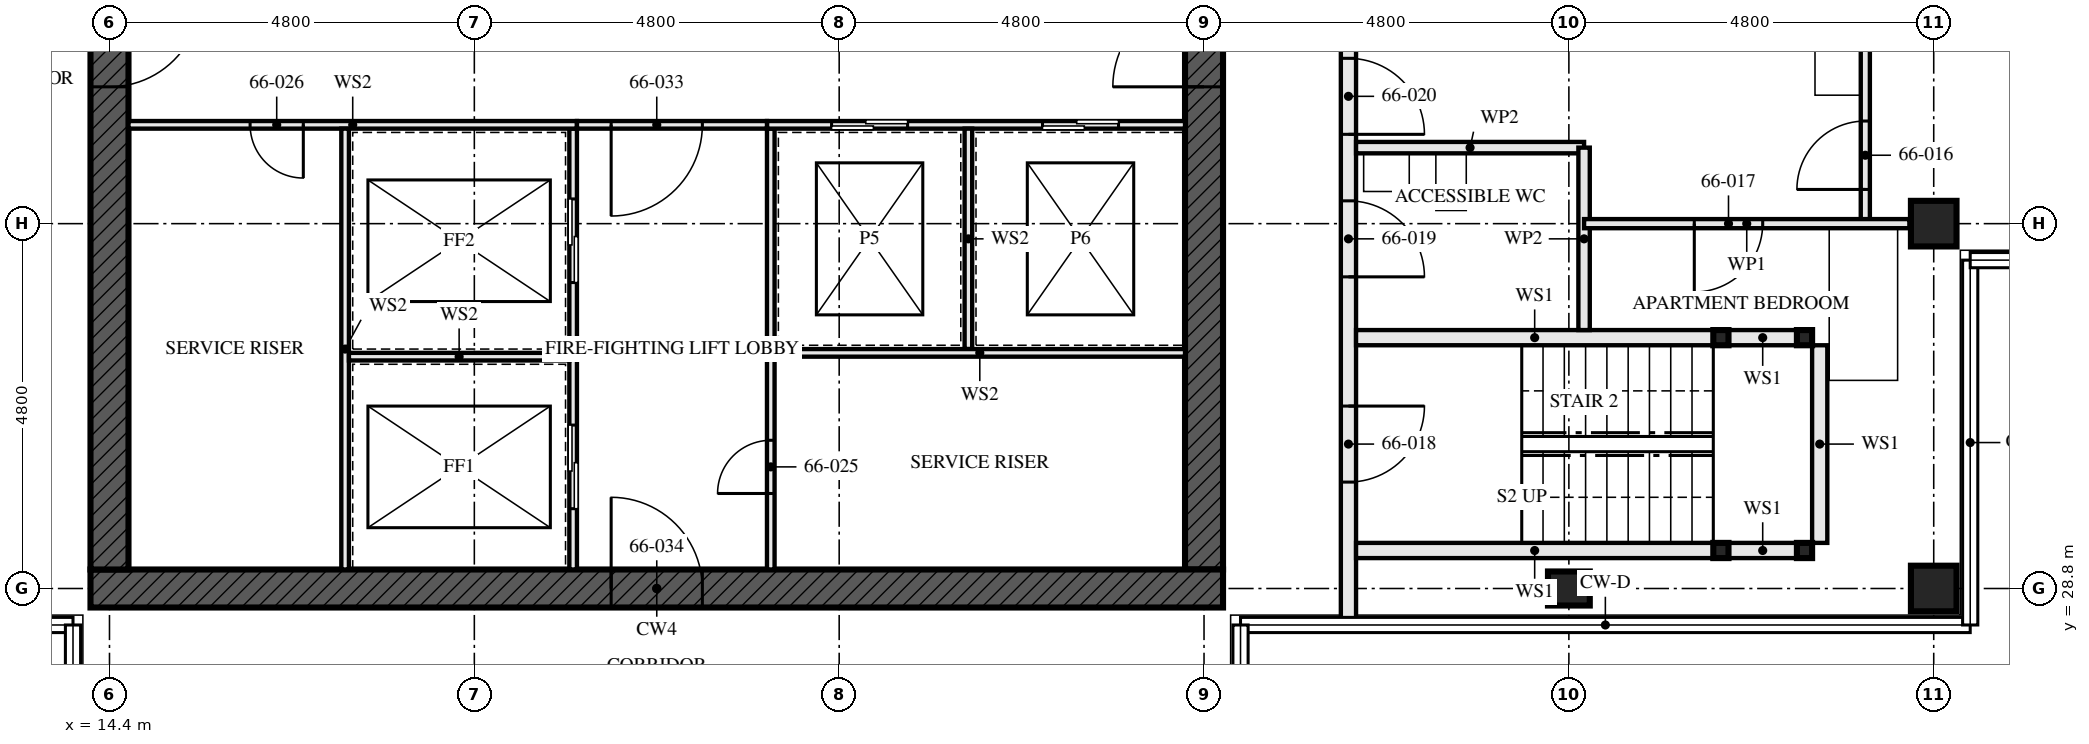
"""IFC4 building model, lengths in metres.
Left out: names, types, materials, properties, quantities, classifications, styles, units other than length and angle.
Written with IfcOpenShell. Run it as: python <this file> out.ifc"""

import sys

from ifc_helpers import new_model, si_unit, direction, frame, frame_2d, origin, origin_2d, place, context, subcontext, project, spatial, rectangle, hollow_rectangle, i_section, extrude, element, fill, save


model = new_model("IFC4")
c1 = context("Model", 3, precision=1e-05, world=origin(), true_north=direction((0.0, 1.0)))
c2 = subcontext(c1, "Body", "Model", "MODEL_VIEW")
j1 = project(units=[si_unit("LENGTHUNIT", "METRE"), si_unit("PLANEANGLEUNIT", "RADIAN")], contexts=[c1])
p1 = place(None, origin())
s1 = spatial("IfcSite", under=j1, at=p1, CompositionType="ELEMENT")
p2 = place(p1, origin())
s2 = spatial("IfcBuilding", under=s1, at=p2, CompositionType="ELEMENT")
p3 = place(p2, frame((0.0, 0.0, 240.0)))
s3 = spatial("IfcBuildingStorey", under=s2, at=p3, CompositionType="ELEMENT", Elevation=240.0)
p4 = place(p3, frame((33.6, 28.8, 0.0), z_axis=(0.0, 0.0, 1.0), x_axis=(0.0, 1.0, 0.0)))
e1 = element("IfcColumn", 1, at=p4, inside=s3, PredefinedType="COLUMN", context=c2, shape_type="SweptSolid", body=[
    extrude(i_section(OverallWidth=0.448, OverallDepth=0.55, WebThickness=0.072, FlangeThickness=0.115, FilletRadius=0.015, at=origin_2d()), origin(), (0.0, 0.0, 1.0), 3.5),
])
for number, where, z_axis, x_axis in (
    (2, (38.4, 28.8, 0.0), (0.0, 0.0, 1.0), (0.0, 1.0, 0.0)),
    (3, (38.4, 33.6, 0.0), (0.0, 0.0, 1.0), (0.0, 1.0, 0.0)),
):
    element("IfcColumn", number, at=place(p3, frame(where, z_axis=z_axis, x_axis=x_axis)), inside=s3, PredefinedType="COLUMN", context=c2, shape_type="SweptSolid", body=[
        extrude(hollow_rectangle(XDim=0.6, YDim=0.6, WallThickness=0.05, at=origin_2d()), origin(), (0.0, 0.0, 1.0), 3.5),
    ])
p5 = place(p3, frame((14.15, 28.8, -0.17), z_axis=(0.0, 0.0, 1.0), x_axis=(1.0, 0.0, 0.0)))
e4 = element("IfcWall", 4, at=p5, inside=s3, PredefinedType="SHEAR", context=c2, shape_type="SweptSolid", body=[
    extrude(rectangle(XDim=14.9, YDim=0.5, at=frame_2d((7.45, 0.0))), origin(), (0.0, 0.0, 1.0), 3.42),
])
p6 = place(p5, frame((6.85, 0.0, 0.17)))
e5 = element("IfcOpeningElement", 5, at=p6, cuts=e4, PredefinedType="OPENING", context=c2, shape_type="SweptSolid", body=[
    extrude(rectangle(XDim=1.2, YDim=2.1, at=frame_2d((0.6, 1.05))), frame((0.0, 0.26, 0.0), z_axis=(0.0, -1.0, 0.0), x_axis=(1.0, 0.0, 0.0)), (0.0, 0.0, 1.0), 0.521),
])
p7 = place(p3, frame((14.4, 42.95, -0.17), z_axis=(0.0, 0.0, 1.0), x_axis=(0.0, -1.0, 0.0)))
e6 = element("IfcWall", 6, at=p7, inside=s3, PredefinedType="SHEAR", context=c2, shape_type="SweptSolid", body=[
    extrude(rectangle(XDim=13.9, YDim=0.5, at=frame_2d((6.95, 0.0))), origin(), (0.0, 0.0, 1.0), 3.42),
])
p8 = place(p7, frame((6.35, 0.0, 0.17)))
e7 = element("IfcOpeningElement", 7, at=p8, cuts=e6, PredefinedType="OPENING", context=c2, shape_type="SweptSolid", body=[
    extrude(rectangle(XDim=1.2, YDim=2.1, at=frame_2d((0.6, 1.05))), frame((0.0, 0.26, 0.0), z_axis=(0.0, -1.0, 0.0), x_axis=(1.0, 0.0, 0.0)), (0.0, 0.0, 1.0), 0.521),
])
p9 = place(p3, frame((28.8, 29.05, -0.17), z_axis=(0.0, 0.0, 1.0), x_axis=(0.0, 1.0, 0.0)))
e8 = element("IfcWall", 8, at=p9, inside=s3, PredefinedType="SHEAR", context=c2, shape_type="SweptSolid", body=[
    extrude(rectangle(XDim=13.9, YDim=0.5, at=frame_2d((6.95, 0.0))), origin(), (0.0, 0.0, 1.0), 3.42),
])
p10 = place(p9, frame((6.35, 0.0, 0.17)))
e9 = element("IfcOpeningElement", 9, at=p10, cuts=e8, PredefinedType="OPENING", context=c2, shape_type="SweptSolid", body=[
    extrude(rectangle(XDim=1.2, YDim=2.1, at=frame_2d((0.6, 1.05))), frame((0.0, 0.26, 0.0), z_axis=(0.0, -1.0, 0.0), x_axis=(1.0, 0.0, 0.0)), (0.0, 0.0, 1.0), 0.521),
])
for number, where, z_axis, x_axis in (
    (10, (36.7, 29.3, 0.0), (0.0, 0.0, 1.0), (1.0, 0.0, 0.0)),
    (11, (36.7, 32.1, 0.0), (0.0, 0.0, 1.0), (1.0, 0.0, 0.0)),
    (12, (35.6, 29.3, 0.0), (0.0, 0.0, 1.0), (1.0, 0.0, 0.0)),
    (13, (35.6, 32.1, 0.0), (0.0, 0.0, 1.0), (1.0, 0.0, 0.0)),
):
    element("IfcColumn", number, at=place(p3, frame(where, z_axis=z_axis, x_axis=x_axis)), inside=s3, PredefinedType="COLUMN", context=c2, shape_type="SweptSolid", body=[
        extrude(hollow_rectangle(XDim=0.2, YDim=0.2, WallThickness=0.008, at=origin_2d()), origin(), (0.0, 0.0, 1.0), 3.25),
    ])
p11 = place(p3, frame((36.6, 29.3, 0.0), z_axis=(0.0, 0.0, 1.0), x_axis=(-1.0, 0.0, 0.0)))
e14 = element("IfcWall", 14, at=p11, inside=s3, PredefinedType="SOLIDWALL", context=c2, shape_type="SweptSolid", body=[
    extrude(rectangle(XDim=0.9, YDim=0.2, at=frame_2d((0.45, 0.0))), origin(), (0.0, 0.0, 1.0), 2.94),
])
p12 = place(p3, frame((35.5, 29.3, 0.0), z_axis=(0.0, 0.0, 1.0), x_axis=(-1.0, 0.0, 0.0)))
e15 = element("IfcWall", 15, at=p12, inside=s3, PredefinedType="SOLIDWALL", context=c2, shape_type="SweptSolid", body=[
    extrude(rectangle(XDim=4.7, YDim=0.2, at=frame_2d((2.35, 0.0))), origin(), (0.0, 0.0, 1.0), 2.94),
])
p13 = place(p3, frame((36.6, 32.1, 0.0), z_axis=(0.0, 0.0, 1.0), x_axis=(-1.0, 0.0, 0.0)))
e16 = element("IfcWall", 16, at=p13, inside=s3, PredefinedType="SOLIDWALL", context=c2, shape_type="SweptSolid", body=[
    extrude(rectangle(XDim=0.9, YDim=0.2, at=frame_2d((0.45, 0.0))), origin(), (0.0, 0.0, 1.0), 2.94),
])
p14 = place(p3, frame((35.5, 32.1, 0.0), z_axis=(0.0, 0.0, 1.0), x_axis=(-1.0, 0.0, 0.0)))
e17 = element("IfcWall", 17, at=p14, inside=s3, PredefinedType="SOLIDWALL", context=c2, shape_type="SweptSolid", body=[
    extrude(rectangle(XDim=4.7, YDim=0.2, at=frame_2d((2.35, 0.0))), origin(), (0.0, 0.0, 1.0), 2.94),
])
p15 = place(p3, frame((36.9, 29.4, 0.0), z_axis=(0.0, 0.0, 1.0), x_axis=(0.0, 1.0, 0.0)))
e18 = element("IfcWall", 18, at=p15, inside=s3, PredefinedType="SOLIDWALL", context=c2, shape_type="SweptSolid", body=[
    extrude(rectangle(XDim=2.6, YDim=0.2, at=frame_2d((1.3, 0.0))), origin(), (0.0, 0.0, 1.0), 3.25),
])
p16 = place(p3, frame((33.8, 32.2, 0.0), z_axis=(0.0, 0.0, 1.0), x_axis=(0.0, 1.0, 0.0)))
e19 = element("IfcWall", 19, at=p16, inside=s3, PredefinedType="PARTITIONING", context=c2, shape_type="SweptSolid", body=[
    extrude(rectangle(XDim=2.4, YDim=0.15, at=frame_2d((1.2, 0.0))), origin(), (0.0, 0.0, 1.0), 2.24),
])
p17 = place(p3, frame((33.8, 34.6, 0.0), z_axis=(0.0, 0.0, 1.0), x_axis=(-1.0, 0.0, 0.0)))
e20 = element("IfcWall", 20, at=p17, inside=s3, PredefinedType="PARTITIONING", context=c2, shape_type="SweptSolid", body=[
    extrude(rectangle(XDim=3.0, YDim=0.15, at=frame_2d((1.5, 0.0))), origin(), (0.0, 0.0, 1.0), 3.25),
])
p18 = place(p3, frame((37.5, 33.6, 0.0), z_axis=(0.0, 0.0, 1.0), x_axis=(0.0, 1.0, 0.0)))
e21 = element("IfcWall", 21, at=p18, inside=s3, PredefinedType="PARTITIONING", context=c2, shape_type="SweptSolid", body=[
    extrude(rectangle(XDim=4.8, YDim=0.12, at=frame_2d((2.4, 0.0))), origin(), (0.0, 0.0, 1.0), 3.25),
])
p19 = place(p18, frame((0.45, 0.0, 0.0)))
e22 = element("IfcOpeningElement", 22, at=p19, cuts=e21, PredefinedType="OPENING", context=c2, shape_type="SweptSolid", body=[
    extrude(rectangle(XDim=0.9, YDim=2.1, at=frame_2d((0.45, 1.05))), frame((0.0, 0.071, 0.0), z_axis=(0.0, -1.0, 0.0), x_axis=(1.0, 0.0, 0.0)), (0.0, 0.0, 1.0), 0.141),
])
p20 = place(p3, frame((38.08, 33.6, 0.0), z_axis=(0.0, 0.0, 1.0), x_axis=(-1.0, 0.0, 0.0)))
e23 = element("IfcWall", 23, at=p20, inside=s3, PredefinedType="PARTITIONING", context=c2, shape_type="SweptSolid", body=[
    extrude(rectangle(XDim=4.28, YDim=0.12, at=frame_2d((2.14, 0.0))), origin(), (0.0, 0.0, 1.0), 2.24),
])
p21 = place(p20, frame((1.93, 0.0, 0.0)))
e24 = element("IfcOpeningElement", 24, at=p21, cuts=e23, PredefinedType="OPENING", context=c2, shape_type="SweptSolid", body=[
    extrude(rectangle(XDim=0.9, YDim=2.1, at=frame_2d((0.45, 1.05))), frame((0.0, 0.071, 0.0), z_axis=(0.0, -1.0, 0.0), x_axis=(1.0, 0.0, 0.0)), (0.0, 0.0, 1.0), 0.141),
])
p22 = place(p3, frame((30.7, 28.345, 0.0), z_axis=(0.0, 0.0, 1.0), x_axis=(0.0, 1.0, 0.0)))
e25 = element("IfcWall", 25, at=p22, inside=s3, PredefinedType="PARTITIONING", context=c2, shape_type="SweptSolid", body=[
    extrude(rectangle(XDim=15.31, YDim=0.2, at=frame_2d((7.655, 0.0))), origin(), (0.0, 0.0, 1.0), 2.24),
])
p23 = place(p22, frame((1.855, 0.0, 0.0)))
e26 = element("IfcOpeningElement", 26, at=p23, cuts=e25, PredefinedType="OPENING", context=c2, shape_type="SweptSolid", body=[
    extrude(rectangle(XDim=1.0, YDim=2.1, at=frame_2d((0.5, 1.05))), frame((0.0, 0.111, 0.0), z_axis=(0.0, -1.0, 0.0), x_axis=(1.0, 0.0, 0.0)), (0.0, 0.0, 1.0), 0.221),
])
p24 = place(p22, frame((4.555, 0.0, 0.0)))
e27 = element("IfcOpeningElement", 27, at=p24, cuts=e25, PredefinedType="OPENING", context=c2, shape_type="SweptSolid", body=[
    extrude(rectangle(XDim=1.0, YDim=2.1, at=frame_2d((0.5, 1.05))), frame((0.0, 0.111, 0.0), z_axis=(0.0, -1.0, 0.0), x_axis=(1.0, 0.0, 0.0)), (0.0, 0.0, 1.0), 0.221),
])
p25 = place(p22, frame((6.43, 0.0, 0.0)))
e28 = element("IfcOpeningElement", 28, at=p25, cuts=e25, PredefinedType="OPENING", context=c2, shape_type="SweptSolid", body=[
    extrude(rectangle(XDim=1.0, YDim=2.1, at=frame_2d((0.5, 1.05))), frame((0.0, 0.111, 0.0), z_axis=(0.0, -1.0, 0.0), x_axis=(1.0, 0.0, 0.0)), (0.0, 0.0, 1.0), 0.221),
])
p26 = place(p3, frame((20.5, 29.05, 0.0), z_axis=(0.0, 0.0, 1.0), x_axis=(0.0, 1.0, 0.0)))
e29 = element("IfcWall", 29, at=p26, inside=s3, PredefinedType="SOLIDWALL", context=c2, shape_type="SweptSolid", body=[
    extrude(rectangle(XDim=5.8, YDim=0.1, at=frame_2d((2.9, 0.0))), origin(), (0.0, 0.0, 1.0), 3.25),
])
p27 = place(p26, frame((0.8, 0.0, 0.0)))
e30 = element("IfcOpeningElement", 30, at=p27, cuts=e29, PredefinedType="OPENING", context=c2, shape_type="SweptSolid", body=[
    extrude(rectangle(XDim=1.1, YDim=2.3, at=frame_2d((0.55, 1.15))), frame((0.0, 0.061, 0.0), z_axis=(0.0, -1.0, 0.0), x_axis=(1.0, 0.0, 0.0)), (0.0, 0.0, 1.0), 0.121),
])
p28 = place(p26, frame((3.775, 0.0, 0.0)))
e31 = element("IfcOpeningElement", 31, at=p28, cuts=e29, PredefinedType="OPENING", context=c2, shape_type="SweptSolid", body=[
    extrude(rectangle(XDim=1.1, YDim=2.3, at=frame_2d((0.55, 1.15))), frame((0.0, 0.061, 0.0), z_axis=(0.0, -1.0, 0.0), x_axis=(1.0, 0.0, 0.0)), (0.0, 0.0, 1.0), 0.121),
])
p29 = place(p3, frame((23.1, 29.05, 0.0), z_axis=(0.0, 0.0, 1.0), x_axis=(0.0, 1.0, 0.0)))
e32 = element("IfcWall", 32, at=p29, inside=s3, PredefinedType="SOLIDWALL", context=c2, shape_type="SweptSolid", body=[
    extrude(rectangle(XDim=5.8, YDim=0.1, at=frame_2d((2.9, 0.0))), origin(), (0.0, 0.0, 1.0), 3.25),
])
p30 = place(p29, frame((1.0, 0.0, 0.0)))
e33 = element("IfcOpeningElement", 33, at=p30, cuts=e32, PredefinedType="OPENING", context=c2, shape_type="SweptSolid", body=[
    extrude(rectangle(XDim=0.7, YDim=2.1, at=frame_2d((0.35, 1.05))), frame((0.0, 0.061, 0.0), z_axis=(0.0, -1.0, 0.0), x_axis=(1.0, 0.0, 0.0)), (0.0, 0.0, 1.0), 0.121),
])
p31 = place(p3, frame((14.65, 34.9, 0.0), z_axis=(0.0, 0.0, 1.0), x_axis=(1.0, 0.0, 0.0)))
e34 = element("IfcWall", 34, at=p31, inside=s3, PredefinedType="SOLIDWALL", context=c2, shape_type="SweptSolid", body=[
    extrude(rectangle(XDim=5.9, YDim=0.1, at=frame_2d((2.95, 0.0))), origin(), (0.0, 0.0, 1.0), 3.25),
])
p32 = place(p31, frame((1.6, 0.0, 0.0)))
e35 = element("IfcOpeningElement", 35, at=p32, cuts=e34, PredefinedType="OPENING", context=c2, shape_type="SweptSolid", body=[
    extrude(rectangle(XDim=0.7, YDim=2.1, at=frame_2d((0.35, 1.05))), frame((0.0, 0.061, 0.0), z_axis=(0.0, -1.0, 0.0), x_axis=(1.0, 0.0, 0.0)), (0.0, 0.0, 1.0), 0.121),
])
p33 = place(p3, frame((23.05, 34.9, 0.0), z_axis=(0.0, 0.0, 1.0), x_axis=(1.0, 0.0, 0.0)))
e36 = element("IfcWall", 36, at=p33, inside=s3, PredefinedType="SOLIDWALL", context=c2, shape_type="SweptSolid", body=[
    extrude(rectangle(XDim=5.5, YDim=0.1, at=frame_2d((2.75, 0.0))), origin(), (0.0, 0.0, 1.0), 3.25),
])
p34 = place(p33, frame((0.85, 0.0, 0.0)))
e37 = element("IfcOpeningElement", 37, at=p34, cuts=e36, PredefinedType="OPENING", context=c2, shape_type="SweptSolid", body=[
    extrude(rectangle(XDim=1.0, YDim=2.1, at=frame_2d((0.5, 1.05))), frame((0.0, 0.061, 0.0), z_axis=(0.0, -1.0, 0.0), x_axis=(1.0, 0.0, 0.0)), (0.0, 0.0, 1.0), 0.121),
])
p35 = place(p33, frame((3.625, 0.0, 0.0)))
e38 = element("IfcOpeningElement", 38, at=p35, cuts=e36, PredefinedType="OPENING", context=c2, shape_type="SweptSolid", body=[
    extrude(rectangle(XDim=1.0, YDim=2.1, at=frame_2d((0.5, 1.05))), frame((0.0, 0.061, 0.0), z_axis=(0.0, -1.0, 0.0), x_axis=(1.0, 0.0, 0.0)), (0.0, 0.0, 1.0), 0.121),
])
p36 = place(p3, frame((20.55, 34.9, 0.0), z_axis=(0.0, 0.0, 1.0), x_axis=(1.0, 0.0, 0.0)))
e39 = element("IfcWall", 39, at=p36, inside=s3, PredefinedType="SOLIDWALL", context=c2, shape_type="SweptSolid", body=[
    extrude(rectangle(XDim=2.5, YDim=0.1, at=frame_2d((1.25, 0.0))), origin(), (0.0, 0.0, 1.0), 3.25),
])
p37 = place(p36, frame((0.45, 0.0, 0.0)))
e40 = element("IfcOpeningElement", 40, at=p37, cuts=e39, PredefinedType="OPENING", context=c2, shape_type="SweptSolid", body=[
    extrude(rectangle(XDim=1.2, YDim=2.1, at=frame_2d((0.6, 1.05))), frame((0.0, 0.061, 0.0), z_axis=(0.0, -1.0, 0.0), x_axis=(1.0, 0.0, 0.0)), (0.0, 0.0, 1.0), 0.121),
])
p38 = place(p3, frame((17.5, 29.05, 0.0), z_axis=(0.0, 0.0, 1.0), x_axis=(0.0, 1.0, 0.0)))
e41 = element("IfcWall", 41, at=p38, inside=s3, PredefinedType="SOLIDWALL", context=c2, shape_type="SweptSolid", body=[
    extrude(rectangle(XDim=5.8, YDim=0.1, at=frame_2d((2.9, 0.0))), origin(), (0.0, 0.0, 1.0), 3.25),
])
p39 = place(p3, frame((17.55, 31.85, 0.0), z_axis=(0.0, 0.0, 1.0), x_axis=(1.0, 0.0, 0.0)))
e42 = element("IfcWall", 42, at=p39, inside=s3, PredefinedType="SOLIDWALL", context=c2, shape_type="SweptSolid", body=[
    extrude(rectangle(XDim=2.9, YDim=0.1, at=frame_2d((1.45, 0.0))), origin(), (0.0, 0.0, 1.0), 3.25),
])
p40 = place(p3, frame((25.7, 31.95, 0.0), z_axis=(0.0, 0.0, 1.0), x_axis=(0.0, 1.0, 0.0)))
e43 = element("IfcWall", 43, at=p40, inside=s3, PredefinedType="SOLIDWALL", context=c2, shape_type="SweptSolid", body=[
    extrude(rectangle(XDim=2.9, YDim=0.1, at=frame_2d((1.45, 0.0))), origin(), (0.0, 0.0, 1.0), 3.25),
])
p41 = place(p3, frame((23.15, 31.9, 0.0), z_axis=(0.0, 0.0, 1.0), x_axis=(1.0, 0.0, 0.0)))
e44 = element("IfcWall", 44, at=p41, inside=s3, PredefinedType="SOLIDWALL", context=c2, shape_type="SweptSolid", body=[
    extrude(rectangle(XDim=5.4, YDim=0.1, at=frame_2d((2.7, 0.0))), origin(), (0.0, 0.0, 1.0), 3.25),
])
p42 = place(p19, origin())
e45 = element("IfcDoor", 45, at=p42, inside=s3, OperationType="SINGLE_SWING_RIGHT", PredefinedType="DOOR", context=c2, shape_type="SweptSolid", body=[
    extrude(rectangle(XDim=0.9, YDim=2.1, at=frame_2d((0.45, 1.05))), frame((0.0, 0.022, 0.0), z_axis=(0.0, -1.0, 0.0), x_axis=(1.0, 0.0, 0.0)), (0.0, 0.0, 1.0), 0.044),
])
fill(e22, e45)
p43 = place(p21, origin())
e46 = element("IfcDoor", 46, at=p43, inside=s3, OperationType="SINGLE_SWING_LEFT", PredefinedType="DOOR", context=c2, shape_type="SweptSolid", body=[
    extrude(rectangle(XDim=0.9, YDim=2.1, at=frame_2d((0.45, 1.05))), frame((0.0, 0.022, 0.0), z_axis=(0.0, -1.0, 0.0), x_axis=(1.0, 0.0, 0.0)), (0.0, 0.0, 1.0), 0.044),
])
fill(e24, e46)
p44 = place(p23, frame((1.0, 0.0, 0.0), z_axis=(0.0, 0.0, 1.0), x_axis=(-1.0, 0.0, 0.0)))
e47 = element("IfcDoor", 47, at=p44, inside=s3, OperationType="SINGLE_SWING_RIGHT", PredefinedType="DOOR", context=c2, shape_type="SweptSolid", body=[
    extrude(rectangle(XDim=1.0, YDim=2.1, at=frame_2d((0.5, 1.05))), frame((0.0, 0.032, 0.0), z_axis=(0.0, -1.0, 0.0), x_axis=(1.0, 0.0, 0.0)), (0.0, 0.0, 1.0), 0.064),
])
fill(e26, e47)
p45 = place(p24, frame((1.0, 0.0, 0.0), z_axis=(0.0, 0.0, 1.0), x_axis=(-1.0, 0.0, 0.0)))
e48 = element("IfcDoor", 48, at=p45, inside=s3, OperationType="SINGLE_SWING_LEFT", PredefinedType="DOOR", context=c2, shape_type="SweptSolid", body=[
    extrude(rectangle(XDim=1.0, YDim=2.1, at=frame_2d((0.5, 1.05))), frame((0.0, 0.027, 0.0), z_axis=(0.0, -1.0, 0.0), x_axis=(1.0, 0.0, 0.0)), (0.0, 0.0, 1.0), 0.054),
])
fill(e27, e48)
p46 = place(p25, frame((1.0, 0.0, 0.0), z_axis=(0.0, 0.0, 1.0), x_axis=(-1.0, 0.0, 0.0)))
e49 = element("IfcDoor", 49, at=p46, inside=s3, OperationType="SINGLE_SWING_LEFT", PredefinedType="DOOR", context=c2, shape_type="SweptSolid", body=[
    extrude(rectangle(XDim=1.0, YDim=2.1, at=frame_2d((0.5, 1.05))), frame((0.0, 0.027, 0.0), z_axis=(0.0, -1.0, 0.0), x_axis=(1.0, 0.0, 0.0)), (0.0, 0.0, 1.0), 0.054),
])
fill(e28, e49)
p47 = place(p27, origin())
e50 = element("IfcDoor", 50, at=p47, inside=s3, OperationType="SLIDING_TO_LEFT", PredefinedType="DOOR", context=c2, shape_type="SweptSolid", body=[
    extrude(rectangle(XDim=1.1, YDim=2.3, at=frame_2d((0.55, 1.15))), frame((0.0, 0.05, 0.0), z_axis=(0.0, -1.0, 0.0), x_axis=(1.0, 0.0, 0.0)), (0.0, 0.0, 1.0), 0.1),
])
fill(e30, e50)
p48 = place(p28, origin())
e51 = element("IfcDoor", 51, at=p48, inside=s3, OperationType="SLIDING_TO_LEFT", PredefinedType="DOOR", context=c2, shape_type="SweptSolid", body=[
    extrude(rectangle(XDim=1.1, YDim=2.3, at=frame_2d((0.55, 1.15))), frame((0.0, 0.05, 0.0), z_axis=(0.0, -1.0, 0.0), x_axis=(1.0, 0.0, 0.0)), (0.0, 0.0, 1.0), 0.1),
])
fill(e31, e51)
p49 = place(p30, origin())
e52 = element("IfcDoor", 52, at=p49, inside=s3, OperationType="SINGLE_SWING_RIGHT", PredefinedType="DOOR", context=c2, shape_type="SweptSolid", body=[
    extrude(rectangle(XDim=0.7, YDim=2.1, at=frame_2d((0.35, 1.05))), frame((0.0, 0.027, 0.0), z_axis=(0.0, -1.0, 0.0), x_axis=(1.0, 0.0, 0.0)), (0.0, 0.0, 1.0), 0.054),
])
fill(e33, e52)
p50 = place(p32, frame((0.7, 0.0, 0.0), z_axis=(0.0, 0.0, 1.0), x_axis=(-1.0, 0.0, 0.0)))
e53 = element("IfcDoor", 53, at=p50, inside=s3, OperationType="SINGLE_SWING_RIGHT", PredefinedType="DOOR", context=c2, shape_type="SweptSolid", body=[
    extrude(rectangle(XDim=0.7, YDim=2.1, at=frame_2d((0.35, 1.05))), frame((0.0, 0.027, 0.0), z_axis=(0.0, -1.0, 0.0), x_axis=(1.0, 0.0, 0.0)), (0.0, 0.0, 1.0), 0.054),
])
fill(e35, e53)
p51 = place(p34, origin())
e54 = element("IfcDoor", 54, at=p51, inside=s3, OperationType="SLIDING_TO_LEFT", PredefinedType="DOOR", context=c2, shape_type="SweptSolid", body=[
    extrude(rectangle(XDim=1.0, YDim=2.1, at=frame_2d((0.5, 1.05))), frame((0.0, 0.05, 0.0), z_axis=(0.0, -1.0, 0.0), x_axis=(1.0, 0.0, 0.0)), (0.0, 0.0, 1.0), 0.1),
])
fill(e37, e54)
p52 = place(p35, origin())
e55 = element("IfcDoor", 55, at=p52, inside=s3, OperationType="SLIDING_TO_LEFT", PredefinedType="DOOR", context=c2, shape_type="SweptSolid", body=[
    extrude(rectangle(XDim=1.0, YDim=2.1, at=frame_2d((0.5, 1.05))), frame((0.0, 0.05, 0.0), z_axis=(0.0, -1.0, 0.0), x_axis=(1.0, 0.0, 0.0)), (0.0, 0.0, 1.0), 0.1),
])
fill(e38, e55)
p53 = place(p37, frame((1.2, 0.0, 0.0), z_axis=(0.0, 0.0, 1.0), x_axis=(-1.0, 0.0, 0.0)))
e56 = element("IfcDoor", 56, at=p53, inside=s3, OperationType="SINGLE_SWING_LEFT", PredefinedType="DOOR", context=c2, shape_type="SweptSolid", body=[
    extrude(rectangle(XDim=1.2, YDim=2.1, at=frame_2d((0.6, 1.05))), frame((0.0, 0.027, 0.0), z_axis=(0.0, -1.0, 0.0), x_axis=(1.0, 0.0, 0.0)), (0.0, 0.0, 1.0), 0.054),
])
fill(e40, e56)
p54 = place(p6, origin())
e57 = element("IfcDoor", 57, at=p54, inside=s3, OperationType="SINGLE_SWING_LEFT", PredefinedType="DOOR", context=c2, shape_type="SweptSolid", body=[
    extrude(rectangle(XDim=1.2, YDim=2.1, at=frame_2d((0.6, 1.05))), frame((0.0, 0.027, 0.0), z_axis=(0.0, -1.0, 0.0), x_axis=(1.0, 0.0, 0.0)), (0.0, 0.0, 1.0), 0.054),
])
fill(e5, e57)
p55 = place(p8, origin())
e58 = element("IfcDoor", 58, at=p55, inside=s3, OperationType="SINGLE_SWING_LEFT", PredefinedType="DOOR", context=c2, shape_type="SweptSolid", body=[
    extrude(rectangle(XDim=1.2, YDim=2.1, at=frame_2d((0.6, 1.05))), frame((0.0, 0.027, 0.0), z_axis=(0.0, -1.0, 0.0), x_axis=(1.0, 0.0, 0.0)), (0.0, 0.0, 1.0), 0.054),
])
fill(e7, e58)
p56 = place(p10, origin())
e59 = element("IfcDoor", 59, at=p56, inside=s3, OperationType="SINGLE_SWING_LEFT", PredefinedType="DOOR", context=c2, shape_type="SweptSolid", body=[
    extrude(rectangle(XDim=1.2, YDim=2.1, at=frame_2d((0.6, 1.05))), frame((0.0, 0.027, 0.0), z_axis=(0.0, -1.0, 0.0), x_axis=(1.0, 0.0, 0.0)), (0.0, 0.0, 1.0), 0.054),
])
fill(e9, e59)
save(model, sys.argv[1])
